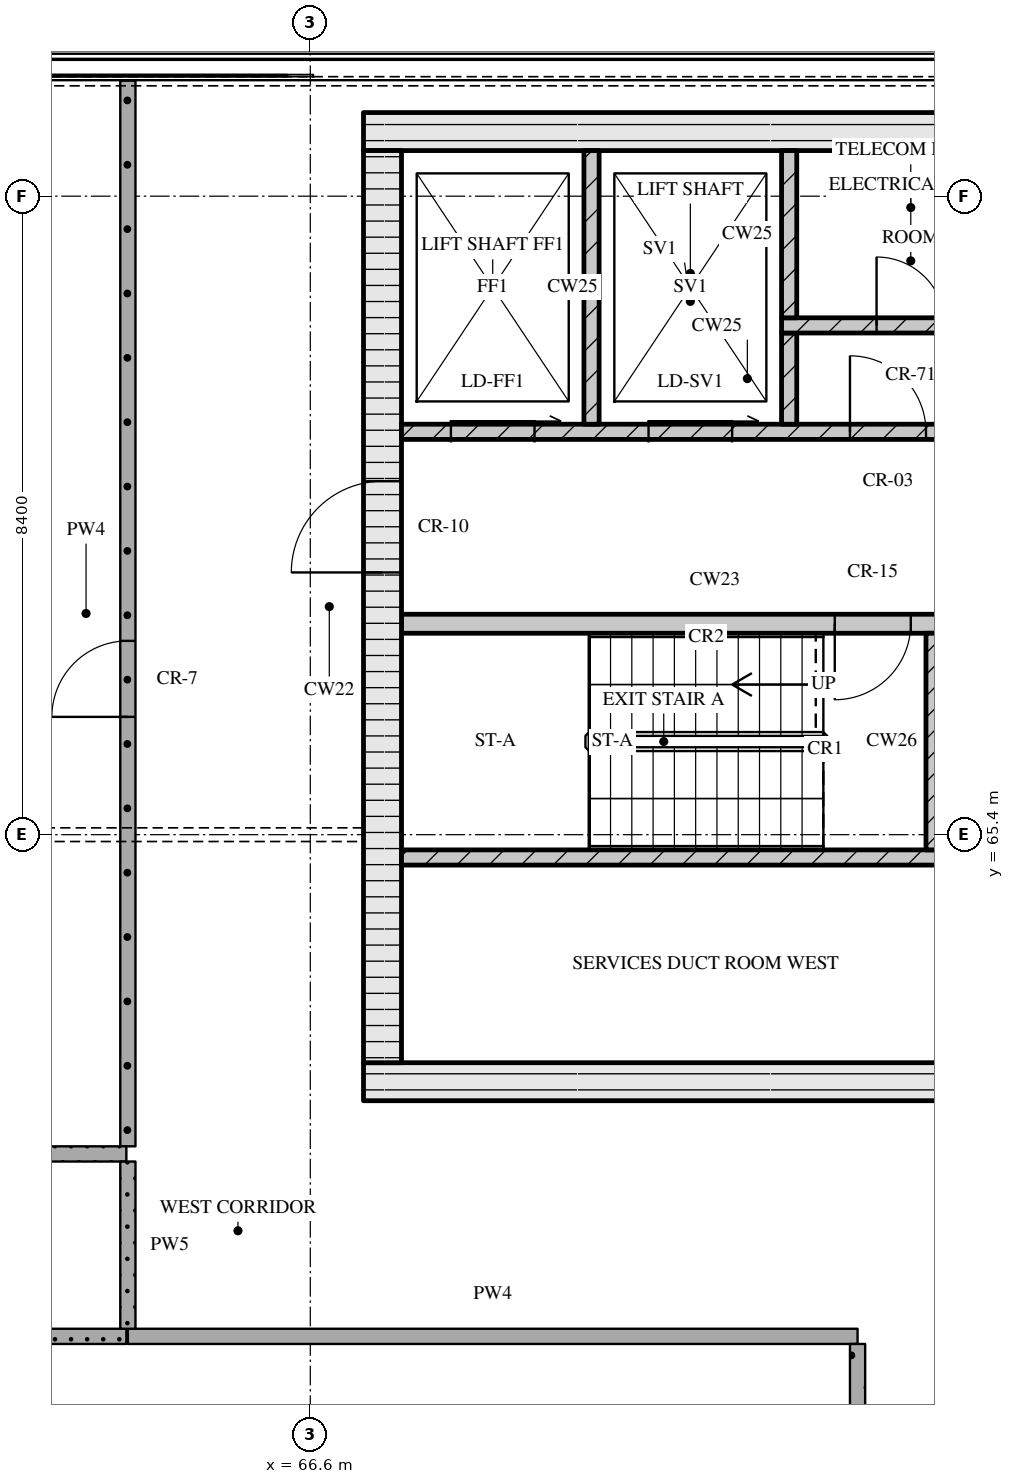
"""IFC4 building model, lengths in metres.
Left out: names, types, materials, properties, quantities, classifications, styles, units other than length and angle.
Written with IfcOpenShell. Run it as: python <this file> out.ifc"""

import sys

from ifc_helpers import new_model, si_unit, direction, frame, frame_2d, origin, place, context, subcontext, project, spatial, rectangle, extrude, element, fill, save


model = new_model("IFC4")
c1 = context("Model", 3, precision=1e-05, world=origin(), true_north=direction((0.0, 1.0)))
c2 = subcontext(c1, "Body", "Model", "MODEL_VIEW")
j1 = project(units=[si_unit("LENGTHUNIT", "METRE"), si_unit("PLANEANGLEUNIT", "RADIAN")], contexts=[c1])
p1 = place(None, origin())
s1 = spatial("IfcSite", under=j1, at=p1, CompositionType="ELEMENT")
p2 = place(p1, origin())
s2 = spatial("IfcBuilding", under=s1, at=p2, CompositionType="ELEMENT")
p3 = place(p2, frame((0.0, 0.0, 310.35)))
s3 = spatial("IfcBuildingStorey", under=s2, at=p3, CompositionType="ELEMENT", Elevation=310.35)
p4 = place(p3, frame((67.3, 62.15, 0.0), z_axis=(0.0, 0.0, 1.0), x_axis=(1.0, 0.0, 0.0)))
e1 = element("IfcWall", 1, at=p4, inside=s3, PredefinedType="SOLIDWALL", context=c2, shape_type="SweptSolid", body=[
    extrude(rectangle(XDim=40.6, YDim=0.5, at=frame_2d((20.3, 0.0))), origin(), (0.0, 0.0, 1.0), 4.2),
])
p5 = place(p4, frame((20.65, 0.0, 0.0)))
e2 = element("IfcOpeningElement", 2, at=p5, cuts=e1, PredefinedType="OPENING", context=c2, shape_type="SweptSolid", body=[
    extrude(rectangle(XDim=1.8, YDim=2.1, at=frame_2d((0.9, 1.05))), frame((0.0, 0.26, 0.0), z_axis=(0.0, -1.0, 0.0), x_axis=(1.0, 0.0, 0.0)), (0.0, 0.0, 1.0), 0.52),
])
p6 = place(p3, frame((67.3, 74.65, 0.0), z_axis=(0.0, 0.0, 1.0), x_axis=(1.0, 0.0, 0.0)))
e3 = element("IfcWall", 3, at=p6, inside=s3, PredefinedType="SOLIDWALL", context=c2, shape_type="SweptSolid", body=[
    extrude(rectangle(XDim=40.6, YDim=0.5, at=frame_2d((20.3, 0.0))), origin(), (0.0, 0.0, 1.0), 4.2),
])
p7 = place(p3, frame((67.55, 62.4, 0.0), z_axis=(0.0, 0.0, 1.0), x_axis=(0.0, 1.0, 0.0)))
e4 = element("IfcWall", 4, at=p7, inside=s3, PredefinedType="SOLIDWALL", context=c2, shape_type="SweptSolid", body=[
    extrude(rectangle(XDim=12.0, YDim=0.5, at=frame_2d((6.0, 0.0))), origin(), (0.0, 0.0, 1.0), 4.2),
])
p8 = place(p7, frame((6.45, 0.0, 0.0)))
e5 = element("IfcOpeningElement", 5, at=p8, cuts=e4, PredefinedType="OPENING", context=c2, shape_type="SweptSolid", body=[
    extrude(rectangle(XDim=1.2, YDim=2.1, at=frame_2d((0.6, 1.05))), frame((0.0, 0.26, 0.0), z_axis=(0.0, -1.0, 0.0), x_axis=(1.0, 0.0, 0.0)), (0.0, 0.0, 1.0), 0.52),
])
p9 = place(p3, frame((67.8, 65.1, 0.0), z_axis=(0.0, 0.0, 1.0), x_axis=(1.0, 0.0, 0.0)))
e6 = element("IfcWall", 6, at=p9, inside=s3, PredefinedType="SOLIDWALL", context=c2, shape_type="SweptSolid", body=[
    extrude(rectangle(XDim=18.5, YDim=0.2, at=frame_2d((9.25, 0.0))), origin(), (0.0, 0.0, 1.0), 4.2),
])
p10 = place(p9, frame((7.27, 0.0, 0.0)))
e7 = element("IfcOpeningElement", 7, at=p10, cuts=e6, PredefinedType="OPENING", context=c2, shape_type="SweptSolid", body=[
    extrude(rectangle(XDim=0.9, YDim=2.1, at=frame_2d((0.45, 1.05))), frame((0.0, 0.11, 0.0), z_axis=(0.0, -1.0, 0.0), x_axis=(1.0, 0.0, 0.0)), (0.0, 0.0, 1.0), 0.22),
])
p11 = place(p9, frame((8.95, 0.0, 0.0)))
e8 = element("IfcOpeningElement", 8, at=p11, cuts=e6, PredefinedType="OPENING", context=c2, shape_type="SweptSolid", body=[
    extrude(rectangle(XDim=0.9, YDim=2.1, at=frame_2d((0.45, 1.05))), frame((0.0, 0.11, 0.0), z_axis=(0.0, -1.0, 0.0), x_axis=(1.0, 0.0, 0.0)), (0.0, 0.0, 1.0), 0.22),
])
p12 = place(p9, frame((11.42, 0.0, 0.0)))
e9 = element("IfcOpeningElement", 9, at=p12, cuts=e6, PredefinedType="OPENING", context=c2, shape_type="SweptSolid", body=[
    extrude(rectangle(XDim=0.9, YDim=2.1, at=frame_2d((0.45, 1.05))), frame((0.0, 0.11, 0.0), z_axis=(0.0, -1.0, 0.0), x_axis=(1.0, 0.0, 0.0)), (0.0, 0.0, 1.0), 0.22),
])
p13 = place(p9, frame((13.92, 0.0, 0.0)))
e10 = element("IfcOpeningElement", 10, at=p13, cuts=e6, PredefinedType="OPENING", context=c2, shape_type="SweptSolid", body=[
    extrude(rectangle(XDim=0.9, YDim=2.1, at=frame_2d((0.45, 1.05))), frame((0.0, 0.11, 0.0), z_axis=(0.0, -1.0, 0.0), x_axis=(1.0, 0.0, 0.0)), (0.0, 0.0, 1.0), 0.22),
])
p14 = place(p9, frame((16.7, 0.0, 0.0)))
e11 = element("IfcOpeningElement", 11, at=p14, cuts=e6, PredefinedType="OPENING", context=c2, shape_type="SweptSolid", body=[
    extrude(rectangle(XDim=0.9, YDim=2.1, at=frame_2d((0.45, 1.05))), frame((0.0, 0.11, 0.0), z_axis=(0.0, -1.0, 0.0), x_axis=(1.0, 0.0, 0.0)), (0.0, 0.0, 1.0), 0.22),
])
p15 = place(p3, frame((74.85, 65.2, 0.0), z_axis=(0.0, 0.0, 1.0), x_axis=(0.0, 1.0, 0.0)))
e12 = element("IfcWall", 12, at=p15, inside=s3, PredefinedType="SOLIDWALL", context=c2, shape_type="SweptSolid", body=[
    extrude(rectangle(XDim=2.85, YDim=0.3, at=frame_2d((1.425, 0.0))), origin(), (0.0, 0.0, 1.0), 4.2),
])
p16 = place(p3, frame((67.8, 68.175, 0.0), z_axis=(0.0, 0.0, 1.0), x_axis=(1.0, 0.0, 0.0)))
e13 = element("IfcWall", 13, at=p16, inside=s3, PredefinedType="SOLIDWALL", context=c2, shape_type="SweptSolid", body=[
    extrude(rectangle(XDim=8.25, YDim=0.25, at=frame_2d((4.125, 0.0))), origin(), (0.0, 0.0, 1.0), 4.2),
])
p17 = place(p16, frame((5.7, 0.0, 0.0)))
e14 = element("IfcOpeningElement", 14, at=p17, cuts=e13, PredefinedType="OPENING", context=c2, shape_type="SweptSolid", body=[
    extrude(rectangle(XDim=1.0, YDim=2.1, at=frame_2d((0.5, 1.05))), frame((0.0, 0.135, 0.0), z_axis=(0.0, -1.0, 0.0), x_axis=(1.0, 0.0, 0.0)), (0.0, 0.0, 1.0), 0.27),
])
p18 = place(p16, frame((7.2, 0.0, 0.0)))
e15 = element("IfcOpeningElement", 15, at=p18, cuts=e13, PredefinedType="OPENING", context=c2, shape_type="SweptSolid", body=[
    extrude(rectangle(XDim=0.8, YDim=2.1, at=frame_2d((0.4, 1.05))), frame((0.0, 0.135, 0.0), z_axis=(0.0, -1.0, 0.0), x_axis=(1.0, 0.0, 0.0)), (0.0, 0.0, 1.0), 0.27),
])
p19 = place(p3, frame((67.8, 70.7, 0.0), z_axis=(0.0, 0.0, 1.0), x_axis=(1.0, 0.0, 0.0)))
e16 = element("IfcWall", 16, at=p19, inside=s3, PredefinedType="SOLIDWALL", context=c2, shape_type="SweptSolid", body=[
    extrude(rectangle(XDim=39.6, YDim=0.2, at=frame_2d((19.8, 0.0))), origin(), (0.0, 0.0, 1.0), 4.2),
])
p20 = place(p19, frame((0.65, 0.0, 0.0)))
e17 = element("IfcOpeningElement", 17, at=p20, cuts=e16, PredefinedType="OPENING", context=c2, shape_type="SweptSolid", body=[
    extrude(rectangle(XDim=1.1, YDim=2.1, at=frame_2d((0.55, 1.05))), frame((0.0, 0.11, 0.0), z_axis=(0.0, -1.0, 0.0), x_axis=(1.0, 0.0, 0.0)), (0.0, 0.0, 1.0), 0.22),
])
p21 = place(p19, frame((3.25, 0.0, 0.0)))
e18 = element("IfcOpeningElement", 18, at=p21, cuts=e16, PredefinedType="OPENING", context=c2, shape_type="SweptSolid", body=[
    extrude(rectangle(XDim=1.1, YDim=2.1, at=frame_2d((0.55, 1.05))), frame((0.0, 0.11, 0.0), z_axis=(0.0, -1.0, 0.0), x_axis=(1.0, 0.0, 0.0)), (0.0, 0.0, 1.0), 0.22),
])
p22 = place(p19, frame((5.9, 0.0, 0.0)))
e19 = element("IfcOpeningElement", 19, at=p22, cuts=e16, PredefinedType="OPENING", context=c2, shape_type="SweptSolid", body=[
    extrude(rectangle(XDim=1.0, YDim=2.1, at=frame_2d((0.5, 1.05))), frame((0.0, 0.11, 0.0), z_axis=(0.0, -1.0, 0.0), x_axis=(1.0, 0.0, 0.0)), (0.0, 0.0, 1.0), 0.22),
])
p23 = place(p19, frame((21.7, 0.0, 0.0)))
e20 = element("IfcOpeningElement", 20, at=p23, cuts=e16, PredefinedType="OPENING", context=c2, shape_type="SweptSolid", body=[
    extrude(rectangle(XDim=1.0, YDim=2.1, at=frame_2d((0.5, 1.05))), frame((0.0, 0.11, 0.0), z_axis=(0.0, -1.0, 0.0), x_axis=(1.0, 0.0, 0.0)), (0.0, 0.0, 1.0), 0.22),
])
p24 = place(p19, frame((32.7, 0.0, 0.0)))
e21 = element("IfcOpeningElement", 21, at=p24, cuts=e16, PredefinedType="OPENING", context=c2, shape_type="SweptSolid", body=[
    extrude(rectangle(XDim=1.0, YDim=2.1, at=frame_2d((0.5, 1.05))), frame((0.0, 0.11, 0.0), z_axis=(0.0, -1.0, 0.0), x_axis=(1.0, 0.0, 0.0)), (0.0, 0.0, 1.0), 0.22),
])
p25 = place(p19, frame((35.25, 0.0, 0.0)))
e22 = element("IfcOpeningElement", 22, at=p25, cuts=e16, PredefinedType="OPENING", context=c2, shape_type="SweptSolid", body=[
    extrude(rectangle(XDim=1.1, YDim=2.1, at=frame_2d((0.55, 1.05))), frame((0.0, 0.11, 0.0), z_axis=(0.0, -1.0, 0.0), x_axis=(1.0, 0.0, 0.0)), (0.0, 0.0, 1.0), 0.22),
])
p26 = place(p19, frame((37.85, 0.0, 0.0)))
e23 = element("IfcOpeningElement", 23, at=p26, cuts=e16, PredefinedType="OPENING", context=c2, shape_type="SweptSolid", body=[
    extrude(rectangle(XDim=1.1, YDim=2.1, at=frame_2d((0.55, 1.05))), frame((0.0, 0.11, 0.0), z_axis=(0.0, -1.0, 0.0), x_axis=(1.0, 0.0, 0.0)), (0.0, 0.0, 1.0), 0.22),
])
p27 = place(p3, frame((70.3, 70.8, 0.0), z_axis=(0.0, 0.0, 1.0), x_axis=(0.0, 1.0, 0.0)))
e24 = element("IfcWall", 24, at=p27, inside=s3, PredefinedType="SOLIDWALL", context=c2, shape_type="SweptSolid", body=[
    extrude(rectangle(XDim=3.6, YDim=0.2, at=frame_2d((1.8, 0.0))), origin(), (0.0, 0.0, 1.0), 4.2),
])
p28 = place(p3, frame((72.9, 70.8, 0.0), z_axis=(0.0, 0.0, 1.0), x_axis=(0.0, 1.0, 0.0)))
e25 = element("IfcWall", 25, at=p28, inside=s3, PredefinedType="SOLIDWALL", context=c2, shape_type="SweptSolid", body=[
    extrude(rectangle(XDim=1.2, YDim=0.2, at=frame_2d((0.6, 0.0))), origin(), (0.0, 0.0, 1.0), 4.2),
])
p29 = place(p3, frame((72.8, 72.1, 0.0), z_axis=(0.0, 0.0, 1.0), x_axis=(1.0, 0.0, 0.0)))
e26 = element("IfcWall", 26, at=p29, inside=s3, PredefinedType="SOLIDWALL", context=c2, shape_type="SweptSolid", body=[
    extrude(rectangle(XDim=11.0, YDim=0.2, at=frame_2d((5.5, 0.0))), origin(), (0.0, 0.0, 1.0), 4.2),
])
p30 = place(p29, frame((1.25, 0.0, 0.0)))
e27 = element("IfcOpeningElement", 27, at=p30, cuts=e26, PredefinedType="OPENING", context=c2, shape_type="SweptSolid", body=[
    extrude(rectangle(XDim=0.9, YDim=2.1, at=frame_2d((0.45, 1.05))), frame((0.0, 0.11, 0.0), z_axis=(0.0, -1.0, 0.0), x_axis=(1.0, 0.0, 0.0)), (0.0, 0.0, 1.0), 0.22),
])
p31 = place(p29, frame((4.95, 0.0, 0.0)))
e28 = element("IfcOpeningElement", 28, at=p31, cuts=e26, PredefinedType="OPENING", context=c2, shape_type="SweptSolid", body=[
    extrude(rectangle(XDim=0.9, YDim=2.1, at=frame_2d((0.45, 1.05))), frame((0.0, 0.11, 0.0), z_axis=(0.0, -1.0, 0.0), x_axis=(1.0, 0.0, 0.0)), (0.0, 0.0, 1.0), 0.22),
])
p32 = place(p29, frame((8.685, 0.0, 0.0)))
e29 = element("IfcOpeningElement", 29, at=p32, cuts=e26, PredefinedType="OPENING", context=c2, shape_type="SweptSolid", body=[
    extrude(rectangle(XDim=0.9, YDim=2.1, at=frame_2d((0.45, 1.05))), frame((0.0, 0.11, 0.0), z_axis=(0.0, -1.0, 0.0), x_axis=(1.0, 0.0, 0.0)), (0.0, 0.0, 1.0), 0.22),
])
p33 = place(p3, frame((72.9, 72.2, 0.0), z_axis=(0.0, 0.0, 1.0), x_axis=(0.0, 1.0, 0.0)))
e30 = element("IfcWall", 30, at=p33, inside=s3, PredefinedType="SOLIDWALL", context=c2, shape_type="SweptSolid", body=[
    extrude(rectangle(XDim=2.2, YDim=0.2, at=frame_2d((1.1, 0.0))), origin(), (0.0, 0.0, 1.0), 4.2),
])
p34 = place(p3, frame((56.7, 58.8, 0.0), z_axis=(0.0, 0.0, 1.0), x_axis=(1.0, 0.0, 0.0)))
e31 = element("IfcWall", 31, at=p34, inside=s3, PredefinedType="PARTITIONING", context=c2, shape_type="SweptSolid", body=[
    extrude(rectangle(XDim=7.48, YDim=0.2, at=frame_2d((3.74, 0.0))), origin(), (0.0, 0.0, 1.0), 4.2),
])
p35 = place(p3, frame((64.2, 58.8, 0.0), z_axis=(0.0, 0.0, 1.0), x_axis=(1.0, 0.0, 0.0)))
e32 = element("IfcWall", 32, at=p35, inside=s3, PredefinedType="PARTITIONING", context=c2, shape_type="SweptSolid", body=[
    extrude(rectangle(XDim=9.6, YDim=0.2, at=frame_2d((4.8, 0.0))), origin(), (0.0, 0.0, 1.0), 4.2),
])
p36 = place(p3, frame((56.7, 61.2, 0.0), z_axis=(0.0, 0.0, 1.0), x_axis=(1.0, 0.0, 0.0)))
e33 = element("IfcWall", 33, at=p36, inside=s3, PredefinedType="PARTITIONING", context=c2, shape_type="SweptSolid", body=[
    extrude(rectangle(XDim=7.48, YDim=0.2, at=frame_2d((3.74, 0.0))), origin(), (0.0, 0.0, 1.0), 4.2),
])
p37 = place(p3, frame((64.2, 61.1, 0.0), z_axis=(0.0, 0.0, 1.0), x_axis=(0.0, -1.0, 0.0)))
e34 = element("IfcWall", 34, at=p37, inside=s3, PredefinedType="PARTITIONING", context=c2, shape_type="SweptSolid", body=[
    extrude(rectangle(XDim=2.2, YDim=0.2, at=frame_2d((1.1, 0.0))), origin(), (0.0, 0.0, 1.0), 4.2),
])
p38 = place(p3, frame((64.2, 61.3, 0.0), z_axis=(0.0, 0.0, 1.0), x_axis=(0.0, 1.0, 0.0)))
e35 = element("IfcWall", 35, at=p38, inside=s3, PredefinedType="PARTITIONING", context=c2, shape_type="SweptSolid", body=[
    extrude(rectangle(XDim=14.02, YDim=0.2, at=frame_2d((7.01, 0.0))), origin(), (0.0, 0.0, 1.0), 4.2),
])
p39 = place(p38, frame((5.65, 0.0, 0.0)))
e36 = element("IfcOpeningElement", 36, at=p39, cuts=e35, PredefinedType="OPENING", context=c2, shape_type="SweptSolid", body=[
    extrude(rectangle(XDim=1.0, YDim=2.1, at=frame_2d((0.5, 1.05))), frame((0.0, 0.11, 0.0), z_axis=(0.0, -1.0, 0.0), x_axis=(1.0, 0.0, 0.0)), (0.0, 0.0, 1.0), 0.22),
])
p40 = place(p3, frame((73.8, 52.6, 0.0), z_axis=(0.0, 0.0, 1.0), x_axis=(0.0, 1.0, 0.0)))
e37 = element("IfcWall", 37, at=p40, inside=s3, PredefinedType="PARTITIONING", context=c2, shape_type="SweptSolid", body=[
    extrude(rectangle(XDim=6.1, YDim=0.2, at=frame_2d((3.05, 0.0))), origin(), (0.0, 0.0, 1.0), 4.2),
])
p41 = place(p40, frame((2.55, 0.0, 0.0)))
e38 = element("IfcOpeningElement", 38, at=p41, cuts=e37, PredefinedType="OPENING", context=c2, shape_type="SweptSolid", body=[
    extrude(rectangle(XDim=1.0, YDim=2.1, at=frame_2d((0.5, 1.05))), frame((0.0, 0.11, 0.0), z_axis=(0.0, -1.0, 0.0), x_axis=(1.0, 0.0, 0.0)), (0.0, 0.0, 1.0), 0.22),
])
p42 = place(p17, origin())
e39 = element("IfcDoor", 39, at=p42, inside=s3, OperationType="SINGLE_SWING_RIGHT", PredefinedType="DOOR", context=c2, shape_type="SweptSolid", body=[
    extrude(rectangle(XDim=1.0, YDim=2.1, at=frame_2d((0.5, 1.05))), frame((0.0, 0.025, 0.0), z_axis=(0.0, -1.0, 0.0), x_axis=(1.0, 0.0, 0.0)), (0.0, 0.0, 1.0), 0.05),
])
fill(e14, e39)
p43 = place(p8, origin())
e40 = element("IfcDoor", 40, at=p43, inside=s3, OperationType="SINGLE_SWING_LEFT", PredefinedType="DOOR", context=c2, shape_type="SweptSolid", body=[
    extrude(rectangle(XDim=1.2, YDim=2.1, at=frame_2d((0.6, 1.05))), frame((0.0, 0.025, 0.0), z_axis=(0.0, -1.0, 0.0), x_axis=(1.0, 0.0, 0.0)), (0.0, 0.0, 1.0), 0.05),
])
fill(e5, e40)
p44 = place(p20, origin())
e41 = element("IfcDoor", 41, at=p44, inside=s3, OperationType="SLIDING_TO_RIGHT", PredefinedType="DOOR", context=c2, shape_type="SweptSolid", body=[
    extrude(rectangle(XDim=1.1, YDim=2.1, at=frame_2d((0.55, 1.05))), frame((0.0, 0.025, 0.0), z_axis=(0.0, -1.0, 0.0), x_axis=(1.0, 0.0, 0.0)), (0.0, 0.0, 1.0), 0.05),
])
fill(e17, e41)
p45 = place(p21, origin())
e42 = element("IfcDoor", 42, at=p45, inside=s3, OperationType="SLIDING_TO_RIGHT", PredefinedType="DOOR", context=c2, shape_type="SweptSolid", body=[
    extrude(rectangle(XDim=1.1, YDim=2.1, at=frame_2d((0.55, 1.05))), frame((0.0, 0.025, 0.0), z_axis=(0.0, -1.0, 0.0), x_axis=(1.0, 0.0, 0.0)), (0.0, 0.0, 1.0), 0.05),
])
fill(e18, e42)
p46 = place(p22, origin())
e43 = element("IfcDoor", 43, at=p46, inside=s3, OperationType="SINGLE_SWING_LEFT", PredefinedType="DOOR", context=c2, shape_type="SweptSolid", body=[
    extrude(rectangle(XDim=1.0, YDim=2.1, at=frame_2d((0.5, 1.05))), frame((0.0, 0.025, 0.0), z_axis=(0.0, -1.0, 0.0), x_axis=(1.0, 0.0, 0.0)), (0.0, 0.0, 1.0), 0.05),
])
fill(e19, e43)
p47 = place(p30, origin())
e44 = element("IfcDoor", 44, at=p47, inside=s3, OperationType="SINGLE_SWING_LEFT", PredefinedType="DOOR", context=c2, shape_type="SweptSolid", body=[
    extrude(rectangle(XDim=0.9, YDim=2.1, at=frame_2d((0.45, 1.05))), frame((0.0, 0.025, 0.0), z_axis=(0.0, -1.0, 0.0), x_axis=(1.0, 0.0, 0.0)), (0.0, 0.0, 1.0), 0.05),
])
fill(e27, e44)
p48 = place(p39, origin())
e45 = element("IfcDoor", 45, at=p48, inside=s3, OperationType="SINGLE_SWING_LEFT", PredefinedType="DOOR", context=c2, shape_type="SweptSolid", body=[
    extrude(rectangle(XDim=1.0, YDim=2.1, at=frame_2d((0.5, 1.05))), frame((0.0, 0.025, 0.0), z_axis=(0.0, -1.0, 0.0), x_axis=(1.0, 0.0, 0.0)), (0.0, 0.0, 1.0), 0.05),
])
fill(e36, e45)
save(model, sys.argv[1])
